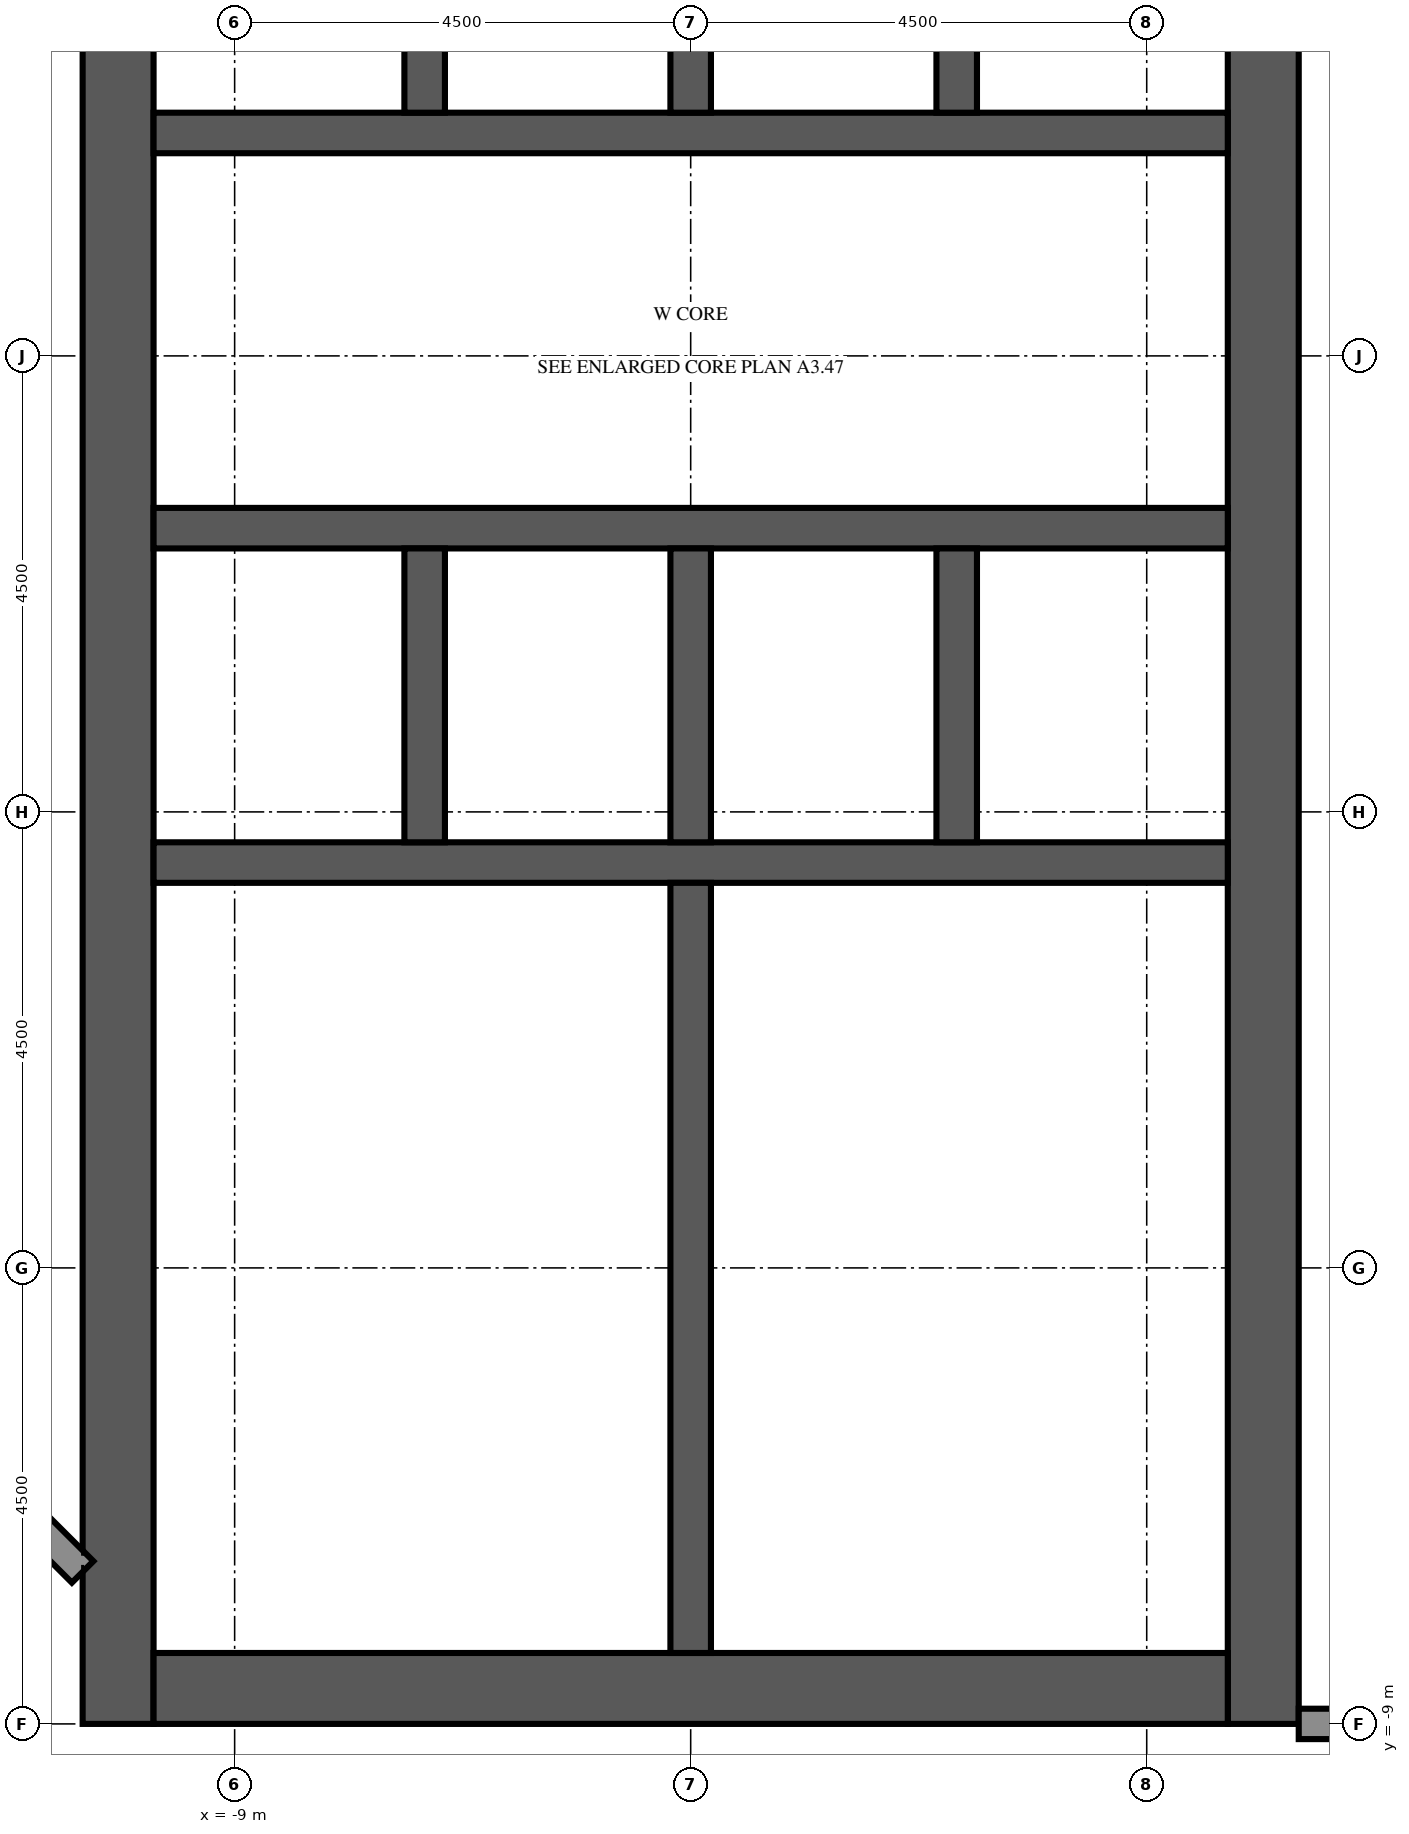
"""IFC4 building model, lengths in metres.
Left out: names, types, materials, properties, quantities, classifications, styles, units other than length and angle.
Written with IfcOpenShell. Run it as: python <this file> out.ifc"""

import sys

from ifc_helpers import new_model, si_unit, direction, frame, frame_2d, origin, place, context, subcontext, project, spatial, rectangle, extrude, element, fill, save


model = new_model("IFC4")
c1 = context("Model", 3, precision=1e-05, world=origin(), true_north=direction((0.0, 1.0)))
c2 = subcontext(c1, "Body", "Model", "MODEL_VIEW")
j1 = project(units=[si_unit("LENGTHUNIT", "METRE"), si_unit("PLANEANGLEUNIT", "RADIAN")], contexts=[c1])
p1 = place(None, origin())
s1 = spatial("IfcSite", under=j1, at=p1, CompositionType="ELEMENT")
p2 = place(p1, origin())
s2 = spatial("IfcBuilding", under=s1, at=p2, CompositionType="ELEMENT")
p3 = place(p2, frame((0.0, 0.0, 326.2)))
s3 = spatial("IfcBuildingStorey", under=s2, at=p3, CompositionType="ELEMENT", Elevation=326.2)
p4 = place(p3, frame((-10.15, -9.0, 0.0), z_axis=(0.0, 0.0, 1.0), x_axis=(0.0, 1.0, 0.0)))
e1 = element("IfcWall", 1, at=p4, inside=s3, PredefinedType="SHEAR", context=c2, shape_type="SweptSolid", body=[
    extrude(rectangle(XDim=27.5, YDim=0.7, at=frame_2d((13.75, 0.0))), origin(), (0.0, 0.0, 1.0), 3.2),
])
p5 = place(p4, frame((12.55, 0.0, 0.0)))
e2 = element("IfcOpeningElement", 2, at=p5, cuts=e1, PredefinedType="OPENING", context=c2, shape_type="SweptSolid", body=[
    extrude(rectangle(XDim=2.4, YDim=2.4, at=frame_2d((1.2, 1.2))), frame((0.0, 0.36, 0.0), z_axis=(0.0, -1.0, 0.0), x_axis=(1.0, 0.0, 0.0)), (0.0, 0.0, 1.0), 0.72),
])
p6 = place(p4, frame((6.825, 0.0, 0.0)))
e3 = element("IfcOpeningElement", 3, at=p6, cuts=e1, PredefinedType="OPENING", context=c2, shape_type="SweptSolid", body=[
    extrude(rectangle(XDim=1.2, YDim=2.1, at=frame_2d((0.6, 1.05))), frame((0.0, 0.36, 0.0), z_axis=(0.0, -1.0, 0.0), x_axis=(1.0, 0.0, 0.0)), (0.0, 0.0, 1.0), 0.72),
])
p7 = place(p4, frame((19.475, 0.0, 0.0)))
e4 = element("IfcOpeningElement", 4, at=p7, cuts=e1, PredefinedType="OPENING", context=c2, shape_type="SweptSolid", body=[
    extrude(rectangle(XDim=1.2, YDim=2.1, at=frame_2d((0.6, 1.05))), frame((0.0, 0.36, 0.0), z_axis=(0.0, -1.0, 0.0), x_axis=(1.0, 0.0, 0.0)), (0.0, 0.0, 1.0), 0.72),
])
p8 = place(p3, frame((1.15, -9.0, 0.0), z_axis=(0.0, 0.0, 1.0), x_axis=(0.0, 1.0, 0.0)))
e5 = element("IfcWall", 5, at=p8, inside=s3, PredefinedType="SHEAR", context=c2, shape_type="SweptSolid", body=[
    extrude(rectangle(XDim=27.5, YDim=0.7, at=frame_2d((13.75, 0.0))), origin(), (0.0, 0.0, 1.0), 3.2),
])
p9 = place(p8, frame((12.55, 0.0, 0.0)))
e6 = element("IfcOpeningElement", 6, at=p9, cuts=e5, PredefinedType="OPENING", context=c2, shape_type="SweptSolid", body=[
    extrude(rectangle(XDim=2.4, YDim=2.4, at=frame_2d((1.2, 1.2))), frame((0.0, 0.36, 0.0), z_axis=(0.0, -1.0, 0.0), x_axis=(1.0, 0.0, 0.0)), (0.0, 0.0, 1.0), 0.72),
])
p10 = place(p8, frame((3.9, 0.0, 0.0)))
e7 = element("IfcOpeningElement", 7, at=p10, cuts=e5, PredefinedType="OPENING", context=c2, shape_type="SweptSolid", body=[
    extrude(rectangle(XDim=1.2, YDim=2.1, at=frame_2d((0.6, 1.05))), frame((0.0, 0.36, 0.0), z_axis=(0.0, -1.0, 0.0), x_axis=(1.0, 0.0, 0.0)), (0.0, 0.0, 1.0), 0.72),
])
p11 = place(p8, frame((22.4, 0.0, 0.0)))
e8 = element("IfcOpeningElement", 8, at=p11, cuts=e5, PredefinedType="OPENING", context=c2, shape_type="SweptSolid", body=[
    extrude(rectangle(XDim=1.2, YDim=2.1, at=frame_2d((0.6, 1.05))), frame((0.0, 0.36, 0.0), z_axis=(0.0, -1.0, 0.0), x_axis=(1.0, 0.0, 0.0)), (0.0, 0.0, 1.0), 0.72),
])
p12 = place(p3, frame((-9.8, -8.65, 0.0), z_axis=(0.0, 0.0, 1.0), x_axis=(1.0, 0.0, 0.0)))
e9 = element("IfcWall", 9, at=p12, inside=s3, PredefinedType="SHEAR", context=c2, shape_type="SweptSolid", body=[
    extrude(rectangle(XDim=10.6, YDim=0.7, at=frame_2d((5.3, 0.0))), origin(), (0.0, 0.0, 1.0), 3.2),
])
p13 = place(p3, frame((-9.8, -0.5, 0.0), z_axis=(0.0, 0.0, 1.0), x_axis=(1.0, 0.0, 0.0)))
e10 = element("IfcWall", 10, at=p13, inside=s3, PredefinedType="SHEAR", context=c2, shape_type="SweptSolid", body=[
    extrude(rectangle(XDim=10.6, YDim=0.4, at=frame_2d((5.3, 0.0))), origin(), (0.0, 0.0, 1.0), 3.2),
])
p14 = place(p3, frame((-9.8, 2.8, 0.0), z_axis=(0.0, 0.0, 1.0), x_axis=(1.0, 0.0, 0.0)))
e11 = element("IfcWall", 11, at=p14, inside=s3, PredefinedType="SHEAR", context=c2, shape_type="SweptSolid", body=[
    extrude(rectangle(XDim=10.6, YDim=0.4, at=frame_2d((5.3, 0.0))), origin(), (0.0, 0.0, 1.0), 3.2),
])
p15 = place(p14, frame((0.688, 0.0, 0.0)))
e12 = element("IfcOpeningElement", 12, at=p15, cuts=e11, PredefinedType="OPENING", context=c2, shape_type="SweptSolid", body=[
    extrude(rectangle(XDim=1.1, YDim=2.1, at=frame_2d((0.55, 1.05))), frame((0.0, 0.21, 0.0), z_axis=(0.0, -1.0, 0.0), x_axis=(1.0, 0.0, 0.0)), (0.0, 0.0, 1.0), 0.42),
])
p16 = place(p14, frame((3.488, 0.0, 0.0)))
e13 = element("IfcOpeningElement", 13, at=p16, cuts=e11, PredefinedType="OPENING", context=c2, shape_type="SweptSolid", body=[
    extrude(rectangle(XDim=1.0, YDim=2.1, at=frame_2d((0.5, 1.05))), frame((0.0, 0.21, 0.0), z_axis=(0.0, -1.0, 0.0), x_axis=(1.0, 0.0, 0.0)), (0.0, 0.0, 1.0), 0.42),
])
p17 = place(p14, frame((6.113, 0.0, 0.0)))
e14 = element("IfcOpeningElement", 14, at=p17, cuts=e11, PredefinedType="OPENING", context=c2, shape_type="SweptSolid", body=[
    extrude(rectangle(XDim=1.0, YDim=2.1, at=frame_2d((0.5, 1.05))), frame((0.0, 0.21, 0.0), z_axis=(0.0, -1.0, 0.0), x_axis=(1.0, 0.0, 0.0)), (0.0, 0.0, 1.0), 0.42),
])
p18 = place(p14, frame((8.863, 0.0, 0.0)))
e15 = element("IfcOpeningElement", 15, at=p18, cuts=e11, PredefinedType="OPENING", context=c2, shape_type="SweptSolid", body=[
    extrude(rectangle(XDim=1.0, YDim=2.1, at=frame_2d((0.5, 1.05))), frame((0.0, 0.21, 0.0), z_axis=(0.0, -1.0, 0.0), x_axis=(1.0, 0.0, 0.0)), (0.0, 0.0, 1.0), 0.42),
])
p19 = place(p3, frame((-9.8, 6.7, 0.0), z_axis=(0.0, 0.0, 1.0), x_axis=(1.0, 0.0, 0.0)))
e16 = element("IfcWall", 16, at=p19, inside=s3, PredefinedType="SHEAR", context=c2, shape_type="SweptSolid", body=[
    extrude(rectangle(XDim=10.6, YDim=0.4, at=frame_2d((5.3, 0.0))), origin(), (0.0, 0.0, 1.0), 3.2),
])
p20 = place(p19, frame((0.738, 0.0, 0.0)))
e17 = element("IfcOpeningElement", 17, at=p20, cuts=e16, PredefinedType="OPENING", context=c2, shape_type="SweptSolid", body=[
    extrude(rectangle(XDim=1.0, YDim=2.1, at=frame_2d((0.5, 1.05))), frame((0.0, 0.21, 0.0), z_axis=(0.0, -1.0, 0.0), x_axis=(1.0, 0.0, 0.0)), (0.0, 0.0, 1.0), 0.42),
])
p21 = place(p19, frame((3.488, 0.0, 0.0)))
e18 = element("IfcOpeningElement", 18, at=p21, cuts=e16, PredefinedType="OPENING", context=c2, shape_type="SweptSolid", body=[
    extrude(rectangle(XDim=1.0, YDim=2.1, at=frame_2d((0.5, 1.05))), frame((0.0, 0.21, 0.0), z_axis=(0.0, -1.0, 0.0), x_axis=(1.0, 0.0, 0.0)), (0.0, 0.0, 1.0), 0.42),
])
p22 = place(p19, frame((6.113, 0.0, 0.0)))
e19 = element("IfcOpeningElement", 19, at=p22, cuts=e16, PredefinedType="OPENING", context=c2, shape_type="SweptSolid", body=[
    extrude(rectangle(XDim=1.0, YDim=2.1, at=frame_2d((0.5, 1.05))), frame((0.0, 0.21, 0.0), z_axis=(0.0, -1.0, 0.0), x_axis=(1.0, 0.0, 0.0)), (0.0, 0.0, 1.0), 0.42),
])
p23 = place(p19, frame((8.863, 0.0, 0.0)))
e20 = element("IfcOpeningElement", 20, at=p23, cuts=e16, PredefinedType="OPENING", context=c2, shape_type="SweptSolid", body=[
    extrude(rectangle(XDim=1.0, YDim=2.1, at=frame_2d((0.5, 1.05))), frame((0.0, 0.21, 0.0), z_axis=(0.0, -1.0, 0.0), x_axis=(1.0, 0.0, 0.0)), (0.0, 0.0, 1.0), 0.42),
])
for number, where, z_axis, x_axis in (
    (21, (-7.125, -0.3, 0.0), (0.0, 0.0, 1.0), (0.0, 1.0, 0.0)),
    (22, (-7.125, 6.9, 0.0), (0.0, 0.0, 1.0), (0.0, 1.0, 0.0)),
    (23, (-4.5, -0.3, 0.0), (0.0, 0.0, 1.0), (0.0, 1.0, 0.0)),
    (24, (-4.5, 6.9, 0.0), (0.0, 0.0, 1.0), (0.0, 1.0, 0.0)),
    (25, (-1.875, -0.3, 0.0), (0.0, 0.0, 1.0), (0.0, 1.0, 0.0)),
    (26, (-1.875, 6.9, 0.0), (0.0, 0.0, 1.0), (0.0, 1.0, 0.0)),
):
    element("IfcWall", number, at=place(p3, frame(where, z_axis=z_axis, x_axis=x_axis)), inside=s3, PredefinedType="SHEAR", context=c2, shape_type="SweptSolid", body=[
        extrude(rectangle(XDim=2.9, YDim=0.4, at=frame_2d((1.45, 0.0))), origin(), (0.0, 0.0, 1.0), 3.2),
    ])
p24 = place(p3, frame((-4.5, -8.3, 0.0), z_axis=(0.0, 0.0, 1.0), x_axis=(0.0, 1.0, 0.0)))
e27 = element("IfcWall", 27, at=p24, inside=s3, PredefinedType="SHEAR", context=c2, shape_type="SweptSolid", body=[
    extrude(rectangle(XDim=7.6, YDim=0.4, at=frame_2d((3.8, 0.0))), origin(), (0.0, 0.0, 1.0), 3.2),
])
p25 = place(p3, frame((1.5, -9.0, 0.0), z_axis=(0.0, 0.0, 1.0), x_axis=(1.0, 0.0, 0.0)))
e28 = element("IfcWall", 28, at=p25, inside=s3, PredefinedType="SOLIDWALL", context=c2, shape_type="SweptSolid", body=[
    extrude(rectangle(XDim=2.65, YDim=0.3, at=frame_2d((1.325, 0.0))), origin(), (0.0, 0.0, 1.0), 0.85),
])
p26 = place(p3, frame((-13.15, -4.85, 0.0), z_axis=(0.0, 0.0, 1.0), x_axis=(0.707106781187, -0.707106781187, 0.0)))
e29 = element("IfcWall", 29, at=p26, inside=s3, PredefinedType="SOLIDWALL", context=c2, shape_type="SweptSolid", body=[
    extrude(rectangle(XDim=3.748, YDim=0.3, at=frame_2d((1.874, 0.0))), origin(), (0.0, 0.0, 1.0), 2.5),
])
p27 = place(p3, frame((-0.7, -8.3, 0.0), z_axis=(0.0, 0.0, 1.0), x_axis=(0.0, 1.0, 0.0)))
e30 = element("IfcWall", 30, at=p27, inside=s3, PredefinedType="PARTITIONING", context=c2, shape_type="SweptSolid", body=[
    extrude(rectangle(XDim=2.584, YDim=0.1, at=frame_2d((1.292, 0.0))), origin(), (0.0, 0.0, 1.0), 3.2),
])
p28 = place(p27, frame((0.792, 0.0, 0.0)))
e31 = element("IfcOpeningElement", 31, at=p28, cuts=e30, PredefinedType="OPENING", context=c2, shape_type="SweptSolid", body=[
    extrude(rectangle(XDim=1.0, YDim=2.1, at=frame_2d((0.5, 1.05))), frame((0.0, 0.06, 0.0), z_axis=(0.0, -1.0, 0.0), x_axis=(1.0, 0.0, 0.0)), (0.0, 0.0, 1.0), 0.12),
])
p29 = place(p3, frame((-0.7, -5.716, 0.0), z_axis=(0.0, 0.0, 1.0), x_axis=(0.0, 1.0, 0.0)))
e32 = element("IfcWall", 32, at=p29, inside=s3, PredefinedType="PARTITIONING", context=c2, shape_type="SweptSolid", body=[
    extrude(rectangle(XDim=2.128, YDim=0.1, at=frame_2d((1.064, 0.0))), origin(), (0.0, 0.0, 1.0), 3.2),
])
p30 = place(p29, frame((0.564, 0.0, 0.0)))
e33 = element("IfcOpeningElement", 33, at=p30, cuts=e32, PredefinedType="OPENING", context=c2, shape_type="SweptSolid", body=[
    extrude(rectangle(XDim=1.0, YDim=2.1, at=frame_2d((0.5, 1.05))), frame((0.0, 0.06, 0.0), z_axis=(0.0, -1.0, 0.0), x_axis=(1.0, 0.0, 0.0)), (0.0, 0.0, 1.0), 0.12),
])
p31 = place(p3, frame((-0.7, -3.588, 0.0), z_axis=(0.0, 0.0, 1.0), x_axis=(0.0, 1.0, 0.0)))
e34 = element("IfcWall", 34, at=p31, inside=s3, PredefinedType="PARTITIONING", context=c2, shape_type="SweptSolid", body=[
    extrude(rectangle(XDim=2.888, YDim=0.1, at=frame_2d((1.444, 0.0))), origin(), (0.0, 0.0, 1.0), 3.2),
])
p32 = place(p31, frame((0.944, 0.0, 0.0)))
e35 = element("IfcOpeningElement", 35, at=p32, cuts=e34, PredefinedType="OPENING", context=c2, shape_type="SweptSolid", body=[
    extrude(rectangle(XDim=1.0, YDim=2.1, at=frame_2d((0.5, 1.05))), frame((0.0, 0.06, 0.0), z_axis=(0.0, -1.0, 0.0), x_axis=(1.0, 0.0, 0.0)), (0.0, 0.0, 1.0), 0.12),
])
for number, where, z_axis, x_axis in (
    (36, (-4.3, -5.716, 0.0), (0.0, 0.0, 1.0), (1.0, 0.0, 0.0)),
    (37, (-4.3, -3.588, 0.0), (0.0, 0.0, 1.0), (1.0, 0.0, 0.0)),
):
    element("IfcWall", number, at=place(p3, frame(where, z_axis=z_axis, x_axis=x_axis)), inside=s3, PredefinedType="PARTITIONING", context=c2, shape_type="SweptSolid", body=[
        extrude(rectangle(XDim=3.6, YDim=0.1, at=frame_2d((1.8, 0.0))), origin(), (0.0, 0.0, 1.0), 3.2),
    ])
p33 = place(p15, origin())
e38 = element("IfcDoor", 38, at=p33, inside=s3, OperationType="DOUBLE_DOOR_SLIDING", PredefinedType="DOOR", context=c2, shape_type="SweptSolid", body=[
    extrude(rectangle(XDim=1.1, YDim=2.1, at=frame_2d((0.55, 1.05))), frame((0.0, 0.025, 0.0), z_axis=(0.0, -1.0, 0.0), x_axis=(1.0, 0.0, 0.0)), (0.0, 0.0, 1.0), 0.05),
])
fill(e12, e38)
p34 = place(p5, origin())
e39 = element("IfcDoor", 39, at=p34, inside=s3, OperationType="DOUBLE_DOOR_DOUBLE_SWING", PredefinedType="DOOR", context=c2, shape_type="SweptSolid", body=[
    extrude(rectangle(XDim=2.4, YDim=2.4, at=frame_2d((1.2, 1.2))), frame((0.0, 0.025, 0.0), z_axis=(0.0, -1.0, 0.0), x_axis=(1.0, 0.0, 0.0)), (0.0, 0.0, 1.0), 0.05),
])
fill(e2, e39)
p35 = place(p9, origin())
e40 = element("IfcDoor", 40, at=p35, inside=s3, OperationType="DOUBLE_DOOR_DOUBLE_SWING", PredefinedType="DOOR", context=c2, shape_type="SweptSolid", body=[
    extrude(rectangle(XDim=2.4, YDim=2.4, at=frame_2d((1.2, 1.2))), frame((0.0, 0.025, 0.0), z_axis=(0.0, -1.0, 0.0), x_axis=(1.0, 0.0, 0.0)), (0.0, 0.0, 1.0), 0.05),
])
fill(e6, e40)
p36 = place(p6, origin())
e41 = element("IfcDoor", 41, at=p36, inside=s3, OperationType="SINGLE_SWING_LEFT", PredefinedType="DOOR", context=c2, shape_type="SweptSolid", body=[
    extrude(rectangle(XDim=1.2, YDim=2.1, at=frame_2d((0.6, 1.05))), frame((0.0, 0.025, 0.0), z_axis=(0.0, -1.0, 0.0), x_axis=(1.0, 0.0, 0.0)), (0.0, 0.0, 1.0), 0.05),
])
fill(e3, e41)
p37 = place(p16, origin())
e42 = element("IfcDoor", 42, at=p37, inside=s3, OperationType="SINGLE_SWING_RIGHT", PredefinedType="DOOR", context=c2, shape_type="SweptSolid", body=[
    extrude(rectangle(XDim=1.0, YDim=2.1, at=frame_2d((0.5, 1.05))), frame((0.0, 0.025, 0.0), z_axis=(0.0, -1.0, 0.0), x_axis=(1.0, 0.0, 0.0)), (0.0, 0.0, 1.0), 0.05),
])
fill(e13, e42)
p38 = place(p17, origin())
e43 = element("IfcDoor", 43, at=p38, inside=s3, OperationType="SINGLE_SWING_LEFT", PredefinedType="DOOR", context=c2, shape_type="SweptSolid", body=[
    extrude(rectangle(XDim=1.0, YDim=2.1, at=frame_2d((0.5, 1.05))), frame((0.0, 0.025, 0.0), z_axis=(0.0, -1.0, 0.0), x_axis=(1.0, 0.0, 0.0)), (0.0, 0.0, 1.0), 0.05),
])
fill(e14, e43)
p39 = place(p18, origin())
e44 = element("IfcDoor", 44, at=p39, inside=s3, OperationType="SINGLE_SWING_RIGHT", PredefinedType="DOOR", context=c2, shape_type="SweptSolid", body=[
    extrude(rectangle(XDim=1.0, YDim=2.1, at=frame_2d((0.5, 1.05))), frame((0.0, 0.025, 0.0), z_axis=(0.0, -1.0, 0.0), x_axis=(1.0, 0.0, 0.0)), (0.0, 0.0, 1.0), 0.05),
])
fill(e15, e44)
p40 = place(p20, origin())
e45 = element("IfcDoor", 45, at=p40, inside=s3, OperationType="SINGLE_SWING_LEFT", PredefinedType="DOOR", context=c2, shape_type="SweptSolid", body=[
    extrude(rectangle(XDim=1.0, YDim=2.1, at=frame_2d((0.5, 1.05))), frame((0.0, 0.025, 0.0), z_axis=(0.0, -1.0, 0.0), x_axis=(1.0, 0.0, 0.0)), (0.0, 0.0, 1.0), 0.05),
])
fill(e17, e45)
p41 = place(p21, origin())
e46 = element("IfcDoor", 46, at=p41, inside=s3, OperationType="SINGLE_SWING_RIGHT", PredefinedType="DOOR", context=c2, shape_type="SweptSolid", body=[
    extrude(rectangle(XDim=1.0, YDim=2.1, at=frame_2d((0.5, 1.05))), frame((0.0, 0.025, 0.0), z_axis=(0.0, -1.0, 0.0), x_axis=(1.0, 0.0, 0.0)), (0.0, 0.0, 1.0), 0.05),
])
fill(e18, e46)
p42 = place(p22, origin())
e47 = element("IfcDoor", 47, at=p42, inside=s3, OperationType="SINGLE_SWING_LEFT", PredefinedType="DOOR", context=c2, shape_type="SweptSolid", body=[
    extrude(rectangle(XDim=1.0, YDim=2.1, at=frame_2d((0.5, 1.05))), frame((0.0, 0.025, 0.0), z_axis=(0.0, -1.0, 0.0), x_axis=(1.0, 0.0, 0.0)), (0.0, 0.0, 1.0), 0.05),
])
fill(e19, e47)
p43 = place(p23, origin())
e48 = element("IfcDoor", 48, at=p43, inside=s3, OperationType="SINGLE_SWING_RIGHT", PredefinedType="DOOR", context=c2, shape_type="SweptSolid", body=[
    extrude(rectangle(XDim=1.0, YDim=2.1, at=frame_2d((0.5, 1.05))), frame((0.0, 0.025, 0.0), z_axis=(0.0, -1.0, 0.0), x_axis=(1.0, 0.0, 0.0)), (0.0, 0.0, 1.0), 0.05),
])
fill(e20, e48)
p44 = place(p10, origin())
e49 = element("IfcDoor", 49, at=p44, inside=s3, OperationType="SINGLE_SWING_LEFT", PredefinedType="DOOR", context=c2, shape_type="SweptSolid", body=[
    extrude(rectangle(XDim=1.2, YDim=2.1, at=frame_2d((0.6, 1.05))), frame((0.0, 0.325, 0.0), z_axis=(0.0, -1.0, 0.0), x_axis=(1.0, 0.0, 0.0)), (0.0, 0.0, 1.0), 0.05),
])
fill(e7, e49)
p45 = place(p28, origin())
e50 = element("IfcDoor", 50, at=p45, inside=s3, OperationType="SINGLE_SWING_RIGHT", PredefinedType="DOOR", context=c2, shape_type="SweptSolid", body=[
    extrude(rectangle(XDim=1.0, YDim=2.1, at=frame_2d((0.5, 1.05))), frame((0.0, 0.025, 0.0), z_axis=(0.0, -1.0, 0.0), x_axis=(1.0, 0.0, 0.0)), (0.0, 0.0, 1.0), 0.05),
])
fill(e31, e50)
p46 = place(p30, origin())
e51 = element("IfcDoor", 51, at=p46, inside=s3, OperationType="SINGLE_SWING_LEFT", PredefinedType="DOOR", context=c2, shape_type="SweptSolid", body=[
    extrude(rectangle(XDim=1.0, YDim=2.1, at=frame_2d((0.5, 1.05))), frame((0.0, 0.025, 0.0), z_axis=(0.0, -1.0, 0.0), x_axis=(1.0, 0.0, 0.0)), (0.0, 0.0, 1.0), 0.05),
])
fill(e33, e51)
p47 = place(p32, origin())
e52 = element("IfcDoor", 52, at=p47, inside=s3, OperationType="SINGLE_SWING_RIGHT", PredefinedType="DOOR", context=c2, shape_type="SweptSolid", body=[
    extrude(rectangle(XDim=1.0, YDim=2.1, at=frame_2d((0.5, 1.05))), frame((0.0, 0.025, 0.0), z_axis=(0.0, -1.0, 0.0), x_axis=(1.0, 0.0, 0.0)), (0.0, 0.0, 1.0), 0.05),
])
fill(e35, e52)
save(model, sys.argv[1])
